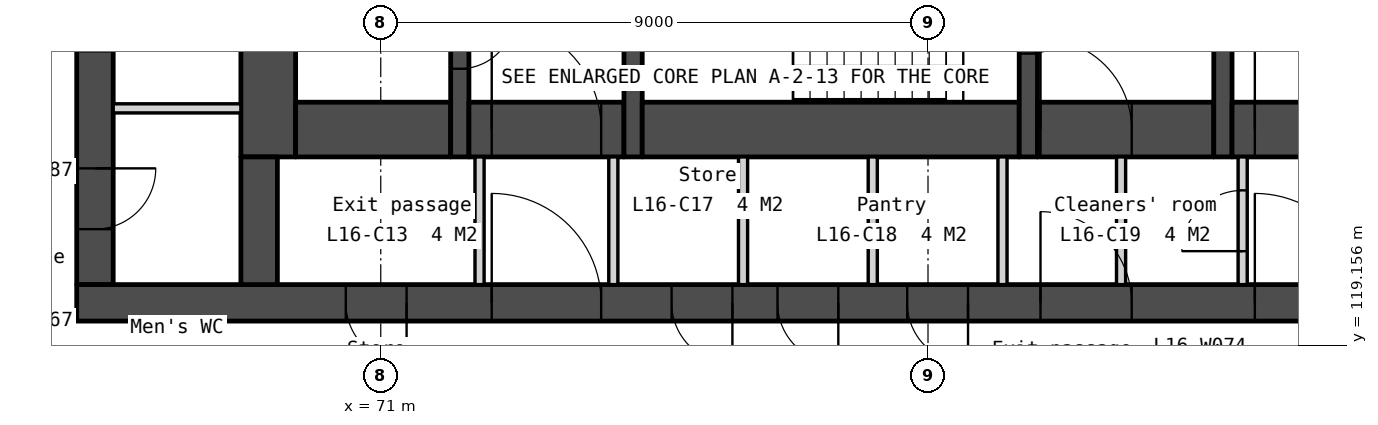
"""IFC4 building model, lengths in metres.
Left out: names, types, materials, properties, quantities, classifications, styles, units other than length and angle.
Written with IfcOpenShell. Run it as: python <this file> out.ifc"""

import sys

from ifc_helpers import new_model, si_unit, direction, frame, frame_2d, origin, place, context, subcontext, project, spatial, polyline, rectangle, outline, extrude, element, fill, save


model = new_model("IFC4")
c1 = context("Model", 3, precision=1e-05, world=origin(), true_north=direction((0.0, 1.0)))
c2 = subcontext(c1, "Body", "Model", "MODEL_VIEW")
j1 = project(units=[si_unit("LENGTHUNIT", "METRE"), si_unit("PLANEANGLEUNIT", "RADIAN")], contexts=[c1])
p1 = place(None, origin())
s1 = spatial("IfcSite", under=j1, at=p1, CompositionType="ELEMENT")
p2 = place(p1, origin())
s2 = spatial("IfcBuilding", under=s1, at=p2, CompositionType="ELEMENT")
p3 = place(p2, frame((0.0, 0.0, 70.0)))
s3 = spatial("IfcBuildingStorey", under=s2, at=p3, CompositionType="ELEMENT", Elevation=70.0)
p4 = place(p3, frame((66.3, 133.95, 0.0), z_axis=(0.0, 0.0, 1.0), x_axis=(0.0, -1.0, 0.0)))
e1 = element("IfcWall", 1, at=p4, inside=s3, PredefinedType="SOLIDWALL", context=c2, shape_type="SweptSolid", body=[
    extrude(rectangle(XDim=13.8, YDim=0.6, at=frame_2d((6.9, 0.0))), origin(), (0.0, 0.0, 1.0), 3.35),
])
p5 = place(p4, frame((0.6, 0.0, 0.0)))
e2 = element("IfcOpeningElement", 2, at=p5, cuts=e1, PredefinedType="OPENING", context=c2, shape_type="SweptSolid", body=[
    extrude(rectangle(XDim=1.1, YDim=2.1, at=frame_2d((0.55, 1.05))), frame((0.0, 0.31, 0.0), z_axis=(0.0, -1.0, 0.0), x_axis=(1.0, 0.0, 0.0)), (0.0, 0.0, 1.0), 0.62),
])
p6 = place(p4, frame((8.963, 0.0, 0.0)))
e3 = element("IfcOpeningElement", 3, at=p6, cuts=e1, PredefinedType="OPENING", context=c2, shape_type="SweptSolid", body=[
    extrude(rectangle(XDim=1.0, YDim=2.1, at=frame_2d((0.5, 1.05))), frame((0.0, 0.31, 0.0), z_axis=(0.0, -1.0, 0.0), x_axis=(1.0, 0.0, 0.0)), (0.0, 0.0, 1.0), 0.62),
])
p7 = place(p4, frame((11.888, 0.0, 0.0)))
e4 = element("IfcOpeningElement", 4, at=p7, cuts=e1, PredefinedType="OPENING", context=c2, shape_type="SweptSolid", body=[
    extrude(rectangle(XDim=1.0, YDim=2.1, at=frame_2d((0.5, 1.05))), frame((0.0, 0.31, 0.0), z_axis=(0.0, -1.0, 0.0), x_axis=(1.0, 0.0, 0.0)), (0.0, 0.0, 1.0), 0.62),
])
p8 = place(p3, frame((66.0, 119.85, 0.0), z_axis=(0.0, 0.0, 1.0), x_axis=(1.0, 0.0, 0.0)))
e5 = element("IfcWall", 5, at=p8, inside=s3, PredefinedType="SOLIDWALL", context=c2, shape_type="SweptSolid", body=[
    extrude(rectangle(XDim=28.0, YDim=0.6, at=frame_2d((14.0, 0.0))), origin(), (0.0, 0.0, 1.0), 3.35),
])
p9 = place(p8, frame((6.825, 0.0, 0.0)))
e6 = element("IfcOpeningElement", 6, at=p9, cuts=e5, PredefinedType="OPENING", context=c2, shape_type="SweptSolid", body=[
    extrude(rectangle(XDim=1.8, YDim=2.1, at=frame_2d((0.9, 1.05))), frame((0.0, 0.31, 0.0), z_axis=(0.0, -1.0, 0.0), x_axis=(1.0, 0.0, 0.0)), (0.0, 0.0, 1.0), 0.62),
])
p10 = place(p8, frame((15.85, 0.0, 0.0)))
e7 = element("IfcOpeningElement", 7, at=p10, cuts=e5, PredefinedType="OPENING", context=c2, shape_type="SweptSolid", body=[
    extrude(rectangle(XDim=1.5, YDim=2.1, at=frame_2d((0.75, 1.05))), frame((0.0, 0.31, 0.0), z_axis=(0.0, -1.0, 0.0), x_axis=(1.0, 0.0, 0.0)), (0.0, 0.0, 1.0), 0.62),
])
p11 = place(p8, frame((19.375, 0.0, 0.0)))
e8 = element("IfcOpeningElement", 8, at=p11, cuts=e5, PredefinedType="OPENING", context=c2, shape_type="SweptSolid", body=[
    extrude(rectangle(XDim=1.8, YDim=2.1, at=frame_2d((0.9, 1.05))), frame((0.0, 0.31, 0.0), z_axis=(0.0, -1.0, 0.0), x_axis=(1.0, 0.0, 0.0)), (0.0, 0.0, 1.0), 0.62),
])
p12 = place(p8, frame((4.425, 0.0, 0.0)))
e9 = element("IfcOpeningElement", 9, at=p12, cuts=e5, PredefinedType="OPENING", context=c2, shape_type="SweptSolid", body=[
    extrude(rectangle(XDim=1.0, YDim=2.1, at=frame_2d((0.5, 1.05))), frame((0.0, 0.31, 0.0), z_axis=(0.0, -1.0, 0.0), x_axis=(1.0, 0.0, 0.0)), (0.0, 0.0, 1.0), 0.62),
])
p13 = place(p8, frame((9.783, 0.0, 0.0)))
e10 = element("IfcOpeningElement", 10, at=p13, cuts=e5, PredefinedType="OPENING", context=c2, shape_type="SweptSolid", body=[
    extrude(rectangle(XDim=1.0, YDim=2.1, at=frame_2d((0.5, 1.05))), frame((0.0, 0.31, 0.0), z_axis=(0.0, -1.0, 0.0), x_axis=(1.0, 0.0, 0.0)), (0.0, 0.0, 1.0), 0.62),
])
p14 = place(p8, frame((11.525, 0.0, 0.0)))
e11 = element("IfcOpeningElement", 11, at=p14, cuts=e5, PredefinedType="OPENING", context=c2, shape_type="SweptSolid", body=[
    extrude(rectangle(XDim=1.0, YDim=2.1, at=frame_2d((0.5, 1.05))), frame((0.0, 0.31, 0.0), z_axis=(0.0, -1.0, 0.0), x_axis=(1.0, 0.0, 0.0)), (0.0, 0.0, 1.0), 0.62),
])
p15 = place(p8, frame((13.658, 0.0, 0.0)))
e12 = element("IfcOpeningElement", 12, at=p15, cuts=e5, PredefinedType="OPENING", context=c2, shape_type="SweptSolid", body=[
    extrude(rectangle(XDim=1.0, YDim=2.1, at=frame_2d((0.5, 1.05))), frame((0.0, 0.31, 0.0), z_axis=(0.0, -1.0, 0.0), x_axis=(1.0, 0.0, 0.0)), (0.0, 0.0, 1.0), 0.62),
])
p16 = place(p8, frame((22.575, 0.0, 0.0)))
e13 = element("IfcOpeningElement", 13, at=p16, cuts=e5, PredefinedType="OPENING", context=c2, shape_type="SweptSolid", body=[
    extrude(rectangle(XDim=1.0, YDim=2.1, at=frame_2d((0.5, 1.05))), frame((0.0, 0.31, 0.0), z_axis=(0.0, -1.0, 0.0), x_axis=(1.0, 0.0, 0.0)), (0.0, 0.0, 1.0), 0.62),
])
p17 = place(p3, frame((66.6, 123.049, 0.0), z_axis=(0.0, 0.0, 1.0), x_axis=(1.0, 0.0, 0.0)))
e14 = element("IfcWall", 14, at=p17, inside=s3, PredefinedType="PARTITIONING", context=c2, shape_type="SweptSolid", body=[
    extrude(rectangle(XDim=2.1, YDim=0.15, at=frame_2d((1.05, 0.0))), origin(), (0.0, 0.0, 1.0), 3.35),
])
p18 = place(p3, frame((69.15, 133.95, 0.0), z_axis=(0.0, 0.0, 1.0), x_axis=(0.0, -1.0, 0.0)))
e15 = element("IfcWall", 15, at=p18, inside=s3, PredefinedType="SOLIDWALL", context=c2, shape_type="SweptSolid", body=[
    extrude(rectangle(XDim=11.7, YDim=0.9, at=frame_2d((5.85, 0.0))), origin(), (0.0, 0.0, 1.0), 3.35),
])
p19 = place(p3, frame((69.0, 122.25, 0.0), z_axis=(0.0, 0.0, 1.0), x_axis=(0.0, -1.0, 0.0)))
e16 = element("IfcWall", 16, at=p19, inside=s3, PredefinedType="SOLIDWALL", context=c2, shape_type="SweptSolid", body=[
    extrude(rectangle(XDim=2.1, YDim=0.6, at=frame_2d((1.05, 0.0))), origin(), (0.0, 0.0, 1.0), 3.35),
])
p20 = place(p3, frame((69.6, 122.7, 0.0), z_axis=(0.0, 0.0, 1.0), x_axis=(1.0, 0.0, 0.0)))
e17 = element("IfcWall", 17, at=p20, inside=s3, PredefinedType="SOLIDWALL", context=c2, shape_type="SweptSolid", body=[
    extrude(rectangle(XDim=2.55, YDim=0.9, at=frame_2d((1.275, 0.0))), origin(), (0.0, 0.0, 1.0), 3.35),
])
p21 = place(p3, frame((72.3, 133.95, 0.0), z_axis=(0.0, 0.0, 1.0), x_axis=(0.0, -1.0, 0.0)))
e18 = element("IfcWall", 18, at=p21, inside=s3, PredefinedType="SOLIDWALL", context=c2, shape_type="SweptSolid", body=[
    extrude(rectangle(XDim=11.7, YDim=0.3, at=frame_2d((5.85, 0.0))), origin(), (0.0, 0.0, 1.0), 3.35),
])
p22 = place(p21, frame((6.95, 0.0, 0.0)))
e19 = element("IfcOpeningElement", 19, at=p22, cuts=e18, PredefinedType="OPENING", context=c2, shape_type="SweptSolid", body=[
    extrude(rectangle(XDim=1.1, YDim=2.1, at=frame_2d((0.55, 1.05))), frame((0.0, 0.16, 0.0), z_axis=(0.0, -1.0, 0.0), x_axis=(1.0, 0.0, 0.0)), (0.0, 0.0, 1.0), 0.32),
])
p23 = place(p21, frame((9.35, 0.0, 0.0)))
e20 = element("IfcOpeningElement", 20, at=p23, cuts=e18, PredefinedType="OPENING", context=c2, shape_type="SweptSolid", body=[
    extrude(rectangle(XDim=0.9, YDim=2.1, at=frame_2d((0.45, 1.05))), frame((0.0, 0.16, 0.0), z_axis=(0.0, -1.0, 0.0), x_axis=(1.0, 0.0, 0.0)), (0.0, 0.0, 1.0), 0.32),
])
p24 = place(p21, frame((5.1, 0.0, 0.0)))
e21 = element("IfcOpeningElement", 21, at=p24, cuts=e18, PredefinedType="OPENING", context=c2, shape_type="SweptSolid", body=[
    extrude(rectangle(XDim=1.0, YDim=2.1, at=frame_2d((0.5, 1.05))), frame((0.0, 0.16, 0.0), z_axis=(0.0, -1.0, 0.0), x_axis=(1.0, 0.0, 0.0)), (0.0, 0.0, 1.0), 0.32),
])
p25 = place(p3, frame((72.45, 122.7, 0.0), z_axis=(0.0, 0.0, 1.0), x_axis=(1.0, 0.0, 0.0)))
e22 = element("IfcWall", 22, at=p25, inside=s3, PredefinedType="SOLIDWALL", context=c2, shape_type="SweptSolid", body=[
    extrude(rectangle(XDim=2.55, YDim=0.9, at=frame_2d((1.275, 0.0))), origin(), (0.0, 0.0, 1.0), 3.35),
])
p26 = place(p25, frame((0.375, 0.0, 0.0)))
e23 = element("IfcOpeningElement", 23, at=p26, cuts=e22, PredefinedType="OPENING", context=c2, shape_type="SweptSolid", body=[
    extrude(rectangle(XDim=1.8, YDim=2.1, at=frame_2d((0.9, 1.05))), frame((0.0, 0.46, 0.0), z_axis=(0.0, -1.0, 0.0), x_axis=(1.0, 0.0, 0.0)), (0.0, 0.0, 1.0), 0.92),
])
for number, where, z_axis, x_axis in (
    (24, (72.625, 122.25, 0.0), (0.0, 0.0, 1.0), (0.0, -1.0, 0.0)),
    (25, (74.825, 122.25, 0.0), (0.0, 0.0, 1.0), (0.0, -1.0, 0.0)),
):
    element("IfcWall", number, at=place(p3, frame(where, z_axis=z_axis, x_axis=x_axis)), inside=s3, PredefinedType="PARTITIONING", context=c2, shape_type="SweptSolid", body=[
        extrude(rectangle(XDim=2.1, YDim=0.15, at=frame_2d((1.05, 0.0))), origin(), (0.0, 0.0, 1.0), 3.35),
    ])
p27 = place(p3, frame((75.15, 133.95, 0.0), z_axis=(0.0, 0.0, 1.0), x_axis=(0.0, -1.0, 0.0)))
e26 = element("IfcWall", 26, at=p27, inside=s3, PredefinedType="SOLIDWALL", context=c2, shape_type="SweptSolid", body=[
    extrude(rectangle(XDim=11.7, YDim=0.3, at=frame_2d((5.85, 0.0))), origin(), (0.0, 0.0, 1.0), 3.35),
])
p28 = place(p3, frame((75.3, 122.7, 0.0), z_axis=(0.0, 0.0, 1.0), x_axis=(1.0, 0.0, 0.0)))
e27 = element("IfcWall", 27, at=p28, inside=s3, PredefinedType="SOLIDWALL", context=c2, shape_type="SweptSolid", body=[
    extrude(rectangle(XDim=6.2, YDim=0.9, at=frame_2d((3.1, 0.0))), origin(), (0.0, 0.0, 1.0), 3.35),
])
for number, where, z_axis, x_axis in (
    (28, (76.958, 122.25, 0.0), (0.0, 0.0, 1.0), (0.0, -1.0, 0.0)),
    (29, (79.092, 122.25, 0.0), (0.0, 0.0, 1.0), (0.0, -1.0, 0.0)),
    (30, (81.225, 122.25, 0.0), (0.0, 0.0, 1.0), (0.0, -1.0, 0.0)),
):
    element("IfcWall", number, at=place(p3, frame(where, z_axis=z_axis, x_axis=x_axis)), inside=s3, PredefinedType="PARTITIONING", context=c2, shape_type="SweptSolid", body=[
        extrude(rectangle(XDim=2.1, YDim=0.15, at=frame_2d((1.05, 0.0))), origin(), (0.0, 0.0, 1.0), 3.35),
    ])
p29 = place(p3, frame((81.65, 125.7, 0.0), z_axis=(0.0, 0.0, 1.0), x_axis=(0.0, -1.0, 0.0)))
e31 = element("IfcWall", 31, at=p29, inside=s3, PredefinedType="SOLIDWALL", context=c2, shape_type="SweptSolid", body=[
    extrude(rectangle(XDim=3.45, YDim=0.3, at=frame_2d((1.725, 0.0))), origin(), (0.0, 0.0, 1.0), 3.35),
])
p30 = place(p29, frame((0.75, 0.0, 0.0)))
e32 = element("IfcOpeningElement", 32, at=p30, cuts=e31, PredefinedType="OPENING", context=c2, shape_type="SweptSolid", body=[
    extrude(rectangle(XDim=1.0, YDim=2.1, at=frame_2d((0.5, 1.05))), frame((0.0, 0.16, 0.0), z_axis=(0.0, -1.0, 0.0), x_axis=(1.0, 0.0, 0.0)), (0.0, 0.0, 1.0), 0.32),
])
p31 = place(p3, frame((81.8, 122.7, 0.0), z_axis=(0.0, 0.0, 1.0), x_axis=(1.0, 0.0, 0.0)))
e33 = element("IfcWall", 33, at=p31, inside=s3, PredefinedType="SOLIDWALL", context=c2, shape_type="SweptSolid", body=[
    extrude(rectangle(XDim=2.9, YDim=0.9, at=frame_2d((1.45, 0.0))), origin(), (0.0, 0.0, 1.0), 3.35),
])
p32 = place(p31, frame((0.05, 0.0, 0.0)))
e34 = element("IfcOpeningElement", 34, at=p32, cuts=e33, PredefinedType="OPENING", context=c2, shape_type="SweptSolid", body=[
    extrude(rectangle(XDim=1.5, YDim=2.1, at=frame_2d((0.75, 1.05))), frame((0.0, 0.46, 0.0), z_axis=(0.0, -1.0, 0.0), x_axis=(1.0, 0.0, 0.0)), (0.0, 0.0, 1.0), 0.92),
])
p33 = place(p3, frame((83.175, 122.25, 0.0), z_axis=(0.0, 0.0, 1.0), x_axis=(0.0, -1.0, 0.0)))
e35 = element("IfcWall", 35, at=p33, inside=s3, PredefinedType="PARTITIONING", context=c2, shape_type="SweptSolid", body=[
    extrude(rectangle(XDim=2.1, YDim=0.15, at=frame_2d((1.05, 0.0))), origin(), (0.0, 0.0, 1.0), 3.35),
])
p34 = place(p3, frame((84.85, 133.95, 0.0), z_axis=(0.0, 0.0, 1.0), x_axis=(0.0, -1.0, 0.0)))
e36 = element("IfcWall", 36, at=p34, inside=s3, PredefinedType="SOLIDWALL", context=c2, shape_type="SweptSolid", body=[
    extrude(rectangle(XDim=11.7, YDim=0.3, at=frame_2d((5.85, 0.0))), origin(), (0.0, 0.0, 1.0), 3.35),
])
p35 = place(p3, frame((85.0, 122.7, 0.0), z_axis=(0.0, 0.0, 1.0), x_axis=(1.0, 0.0, 0.0)))
e37 = element("IfcWall", 37, at=p35, inside=s3, PredefinedType="SOLIDWALL", context=c2, shape_type="SweptSolid", body=[
    extrude(rectangle(XDim=2.55, YDim=0.9, at=frame_2d((1.275, 0.0))), origin(), (0.0, 0.0, 1.0), 3.35),
])
p36 = place(p35, frame((0.375, 0.0, 0.0)))
e38 = element("IfcOpeningElement", 38, at=p36, cuts=e37, PredefinedType="OPENING", context=c2, shape_type="SweptSolid", body=[
    extrude(rectangle(XDim=1.8, YDim=2.1, at=frame_2d((0.9, 1.05))), frame((0.0, 0.46, 0.0), z_axis=(0.0, -1.0, 0.0), x_axis=(1.0, 0.0, 0.0)), (0.0, 0.0, 1.0), 0.92),
])
p37 = place(p3, frame((85.175, 122.25, 0.0), z_axis=(0.0, 0.0, 1.0), x_axis=(0.0, -1.0, 0.0)))
e39 = element("IfcWall", 39, at=p37, inside=s3, PredefinedType="PARTITIONING", context=c2, shape_type="SweptSolid", body=[
    extrude(rectangle(XDim=2.1, YDim=0.15, at=frame_2d((1.05, 0.0))), origin(), (0.0, 0.0, 1.0), 3.35),
])
p38 = place(p37, frame((0.55, 0.0, 0.0)))
e40 = element("IfcOpeningElement", 40, at=p38, cuts=e39, PredefinedType="OPENING", context=c2, shape_type="SweptSolid", body=[
    extrude(rectangle(XDim=1.0, YDim=2.1, at=frame_2d((0.5, 1.05))), frame((0.0, 0.085, 0.0), z_axis=(0.0, -1.0, 0.0), x_axis=(1.0, 0.0, 0.0)), (0.0, 0.0, 1.0), 0.17),
])
p39 = place(p3, frame((54.495, 129.397, -0.15), z_axis=(0.0, 0.0, 1.0), x_axis=(0.499999201451, -0.866025864826, 0.0)))
e41 = element("IfcWall", 41, at=p39, inside=s3, PredefinedType="SOLIDWALL", context=c2, shape_type="SweptSolid", body=[
    extrude(outline(polyline([(44.8, 0.0), (44.8, 3.5), (0.0, 3.5), (0.0, 0.0), (44.8, 0.0)])), frame((0.0, 0.225, 0.0), z_axis=(0.0, -1.0, 0.0), x_axis=(1.0, 0.0, 0.0)), (0.0, 0.0, 1.0), 0.45),
])
p40 = place(p39, frame((0.786, 0.0, 1.05)))
e42 = element("IfcOpeningElement", 42, at=p40, cuts=e41, PredefinedType="OPENING", context=c2, shape_type="SweptSolid", body=[
    extrude(rectangle(XDim=1.2, YDim=1.5, at=frame_2d((0.6, 0.75))), frame((0.0, 0.235, 0.0), z_axis=(0.0, -1.0, 0.0), x_axis=(1.0, 0.0, 0.0)), (0.0, 0.0, 1.0), 0.47),
])
p41 = place(p39, frame((6.91, 0.0, 1.05)))
e43 = element("IfcOpeningElement", 43, at=p41, cuts=e41, PredefinedType="OPENING", context=c2, shape_type="SweptSolid", body=[
    extrude(rectangle(XDim=1.8, YDim=1.5, at=frame_2d((0.9, 0.75))), frame((0.0, 0.235, 0.0), z_axis=(0.0, -1.0, 0.0), x_axis=(1.0, 0.0, 0.0)), (0.0, 0.0, 1.0), 0.47),
])
p42 = place(p39, frame((9.21, 0.0, 1.05)))
e44 = element("IfcOpeningElement", 44, at=p42, cuts=e41, PredefinedType="OPENING", context=c2, shape_type="SweptSolid", body=[
    extrude(rectangle(XDim=1.8, YDim=1.5, at=frame_2d((0.9, 0.75))), frame((0.0, 0.235, 0.0), z_axis=(0.0, -1.0, 0.0), x_axis=(1.0, 0.0, 0.0)), (0.0, 0.0, 1.0), 0.47),
])
p43 = place(p39, frame((15.87, 0.0, 1.05)))
e45 = element("IfcOpeningElement", 45, at=p43, cuts=e41, PredefinedType="OPENING", context=c2, shape_type="SweptSolid", body=[
    extrude(rectangle(XDim=1.8, YDim=1.5, at=frame_2d((0.9, 0.75))), frame((0.0, 0.235, 0.0), z_axis=(0.0, -1.0, 0.0), x_axis=(1.0, 0.0, 0.0)), (0.0, 0.0, 1.0), 0.47),
])
p44 = place(p39, frame((18.17, 0.0, 1.05)))
e46 = element("IfcOpeningElement", 46, at=p44, cuts=e41, PredefinedType="OPENING", context=c2, shape_type="SweptSolid", body=[
    extrude(rectangle(XDim=1.8, YDim=1.5, at=frame_2d((0.9, 0.75))), frame((0.0, 0.235, 0.0), z_axis=(0.0, -1.0, 0.0), x_axis=(1.0, 0.0, 0.0)), (0.0, 0.0, 1.0), 0.47),
])
p45 = place(p39, frame((24.83, 0.0, 1.05)))
e47 = element("IfcOpeningElement", 47, at=p45, cuts=e41, PredefinedType="OPENING", context=c2, shape_type="SweptSolid", body=[
    extrude(rectangle(XDim=1.8, YDim=1.5, at=frame_2d((0.9, 0.75))), frame((0.0, 0.235, 0.0), z_axis=(0.0, -1.0, 0.0), x_axis=(1.0, 0.0, 0.0)), (0.0, 0.0, 1.0), 0.47),
])
p46 = place(p39, frame((27.13, 0.0, 1.05)))
e48 = element("IfcOpeningElement", 48, at=p46, cuts=e41, PredefinedType="OPENING", context=c2, shape_type="SweptSolid", body=[
    extrude(rectangle(XDim=1.8, YDim=1.5, at=frame_2d((0.9, 0.75))), frame((0.0, 0.235, 0.0), z_axis=(0.0, -1.0, 0.0), x_axis=(1.0, 0.0, 0.0)), (0.0, 0.0, 1.0), 0.47),
])
p47 = place(p39, frame((33.79, 0.0, 1.05)))
e49 = element("IfcOpeningElement", 49, at=p47, cuts=e41, PredefinedType="OPENING", context=c2, shape_type="SweptSolid", body=[
    extrude(rectangle(XDim=1.8, YDim=1.5, at=frame_2d((0.9, 0.75))), frame((0.0, 0.235, 0.0), z_axis=(0.0, -1.0, 0.0), x_axis=(1.0, 0.0, 0.0)), (0.0, 0.0, 1.0), 0.47),
])
p48 = place(p39, frame((36.09, 0.0, 1.05)))
e50 = element("IfcOpeningElement", 50, at=p48, cuts=e41, PredefinedType="OPENING", context=c2, shape_type="SweptSolid", body=[
    extrude(rectangle(XDim=1.8, YDim=1.5, at=frame_2d((0.9, 0.75))), frame((0.0, 0.235, 0.0), z_axis=(0.0, -1.0, 0.0), x_axis=(1.0, 0.0, 0.0)), (0.0, 0.0, 1.0), 0.47),
])
p49 = place(p39, frame((42.814, 0.0, 1.05)))
e51 = element("IfcOpeningElement", 51, at=p49, cuts=e41, PredefinedType="OPENING", context=c2, shape_type="SweptSolid", body=[
    extrude(rectangle(XDim=1.2, YDim=1.5, at=frame_2d((0.6, 0.75))), frame((0.0, 0.235, 0.0), z_axis=(0.0, -1.0, 0.0), x_axis=(1.0, 0.0, 0.0)), (0.0, 0.0, 1.0), 0.47),
])
p50 = place(p36, origin())
e52 = element("IfcDoor", 52, at=p50, inside=s3, OperationType="DOUBLE_DOOR_DOUBLE_SWING", PredefinedType="DOOR", context=c2, shape_type="SweptSolid", body=[
    extrude(rectangle(XDim=1.8, YDim=2.1, at=frame_2d((0.9, 1.05))), frame((0.0, 0.025, 0.0), z_axis=(0.0, -1.0, 0.0), x_axis=(1.0, 0.0, 0.0)), (0.0, 0.0, 1.0), 0.05),
])
fill(e38, e52)
p51 = place(p26, origin())
e53 = element("IfcDoor", 53, at=p51, inside=s3, OperationType="DOUBLE_DOOR_DOUBLE_SWING", PredefinedType="DOOR", context=c2, shape_type="SweptSolid", body=[
    extrude(rectangle(XDim=1.8, YDim=2.1, at=frame_2d((0.9, 1.05))), frame((0.0, 0.025, 0.0), z_axis=(0.0, -1.0, 0.0), x_axis=(1.0, 0.0, 0.0)), (0.0, 0.0, 1.0), 0.05),
])
fill(e23, e53)
p52 = place(p32, origin())
e54 = element("IfcDoor", 54, at=p52, inside=s3, OperationType="DOUBLE_DOOR_DOUBLE_SWING", PredefinedType="DOOR", context=c2, shape_type="SweptSolid", body=[
    extrude(rectangle(XDim=1.5, YDim=2.1, at=frame_2d((0.75, 1.05))), frame((0.0, 0.025, 0.0), z_axis=(0.0, -1.0, 0.0), x_axis=(1.0, 0.0, 0.0)), (0.0, 0.0, 1.0), 0.05),
])
fill(e34, e54)
p53 = place(p9, origin())
e55 = element("IfcDoor", 55, at=p53, inside=s3, OperationType="DOUBLE_DOOR_DOUBLE_SWING", PredefinedType="DOOR", context=c2, shape_type="SweptSolid", body=[
    extrude(rectangle(XDim=1.8, YDim=2.1, at=frame_2d((0.9, 1.05))), frame((0.0, 0.025, 0.0), z_axis=(0.0, -1.0, 0.0), x_axis=(1.0, 0.0, 0.0)), (0.0, 0.0, 1.0), 0.05),
])
fill(e6, e55)
p54 = place(p10, origin())
e56 = element("IfcDoor", 56, at=p54, inside=s3, OperationType="DOUBLE_DOOR_DOUBLE_SWING", PredefinedType="DOOR", context=c2, shape_type="SweptSolid", body=[
    extrude(rectangle(XDim=1.5, YDim=2.1, at=frame_2d((0.75, 1.05))), frame((0.0, 0.025, 0.0), z_axis=(0.0, -1.0, 0.0), x_axis=(1.0, 0.0, 0.0)), (0.0, 0.0, 1.0), 0.05),
])
fill(e7, e56)
p55 = place(p11, origin())
e57 = element("IfcDoor", 57, at=p55, inside=s3, OperationType="DOUBLE_DOOR_DOUBLE_SWING", PredefinedType="DOOR", context=c2, shape_type="SweptSolid", body=[
    extrude(rectangle(XDim=1.8, YDim=2.1, at=frame_2d((0.9, 1.05))), frame((0.0, 0.025, 0.0), z_axis=(0.0, -1.0, 0.0), x_axis=(1.0, 0.0, 0.0)), (0.0, 0.0, 1.0), 0.05),
])
fill(e8, e57)
p56 = place(p23, origin())
e58 = element("IfcDoor", 58, at=p56, inside=s3, OperationType="SINGLE_SWING_LEFT", PredefinedType="DOOR", context=c2, shape_type="SweptSolid", body=[
    extrude(rectangle(XDim=0.9, YDim=2.1, at=frame_2d((0.45, 1.05))), frame((0.0, 0.025, 0.0), z_axis=(0.0, -1.0, 0.0), x_axis=(1.0, 0.0, 0.0)), (0.0, 0.0, 1.0), 0.05),
])
fill(e20, e58)
p57 = place(p12, origin())
e59 = element("IfcDoor", 59, at=p57, inside=s3, OperationType="SINGLE_SWING_RIGHT", PredefinedType="DOOR", context=c2, shape_type="SweptSolid", body=[
    extrude(rectangle(XDim=1.0, YDim=2.1, at=frame_2d((0.5, 1.05))), frame((0.0, 0.025, 0.0), z_axis=(0.0, -1.0, 0.0), x_axis=(1.0, 0.0, 0.0)), (0.0, 0.0, 1.0), 0.05),
])
fill(e9, e59)
p58 = place(p13, origin())
e60 = element("IfcDoor", 60, at=p58, inside=s3, OperationType="SINGLE_SWING_RIGHT", PredefinedType="DOOR", context=c2, shape_type="SweptSolid", body=[
    extrude(rectangle(XDim=1.0, YDim=2.1, at=frame_2d((0.5, 1.05))), frame((0.0, 0.025, 0.0), z_axis=(0.0, -1.0, 0.0), x_axis=(1.0, 0.0, 0.0)), (0.0, 0.0, 1.0), 0.05),
])
fill(e10, e60)
p59 = place(p14, origin())
e61 = element("IfcDoor", 61, at=p59, inside=s3, OperationType="SINGLE_SWING_RIGHT", PredefinedType="DOOR", context=c2, shape_type="SweptSolid", body=[
    extrude(rectangle(XDim=1.0, YDim=2.1, at=frame_2d((0.5, 1.05))), frame((0.0, 0.025, 0.0), z_axis=(0.0, -1.0, 0.0), x_axis=(1.0, 0.0, 0.0)), (0.0, 0.0, 1.0), 0.05),
])
fill(e11, e61)
p60 = place(p15, origin())
e62 = element("IfcDoor", 62, at=p60, inside=s3, OperationType="SINGLE_SWING_RIGHT", PredefinedType="DOOR", context=c2, shape_type="SweptSolid", body=[
    extrude(rectangle(XDim=1.0, YDim=2.1, at=frame_2d((0.5, 1.05))), frame((0.0, 0.025, 0.0), z_axis=(0.0, -1.0, 0.0), x_axis=(1.0, 0.0, 0.0)), (0.0, 0.0, 1.0), 0.05),
])
fill(e12, e62)
p61 = place(p38, origin())
e63 = element("IfcDoor", 63, at=p61, inside=s3, OperationType="SINGLE_SWING_RIGHT", PredefinedType="DOOR", context=c2, shape_type="SweptSolid", body=[
    extrude(rectangle(XDim=1.0, YDim=2.1, at=frame_2d((0.5, 1.05))), frame((0.0, 0.025, 0.0), z_axis=(0.0, -1.0, 0.0), x_axis=(1.0, 0.0, 0.0)), (0.0, 0.0, 1.0), 0.05),
])
fill(e40, e63)
p62 = place(p30, origin())
e64 = element("IfcDoor", 64, at=p62, inside=s3, OperationType="SINGLE_SWING_LEFT", PredefinedType="DOOR", context=c2, shape_type="SweptSolid", body=[
    extrude(rectangle(XDim=1.0, YDim=2.1, at=frame_2d((0.5, 1.05))), frame((0.0, 0.025, 0.0), z_axis=(0.0, -1.0, 0.0), x_axis=(1.0, 0.0, 0.0)), (0.0, 0.0, 1.0), 0.05),
])
fill(e32, e64)
p63 = place(p7, origin())
e65 = element("IfcDoor", 65, at=p63, inside=s3, OperationType="SINGLE_SWING_LEFT", PredefinedType="DOOR", context=c2, shape_type="SweptSolid", body=[
    extrude(rectangle(XDim=1.0, YDim=2.1, at=frame_2d((0.5, 1.05))), frame((0.0, 0.025, 0.0), z_axis=(0.0, -1.0, 0.0), x_axis=(1.0, 0.0, 0.0)), (0.0, 0.0, 1.0), 0.05),
])
fill(e4, e65)
save(model, sys.argv[1])
